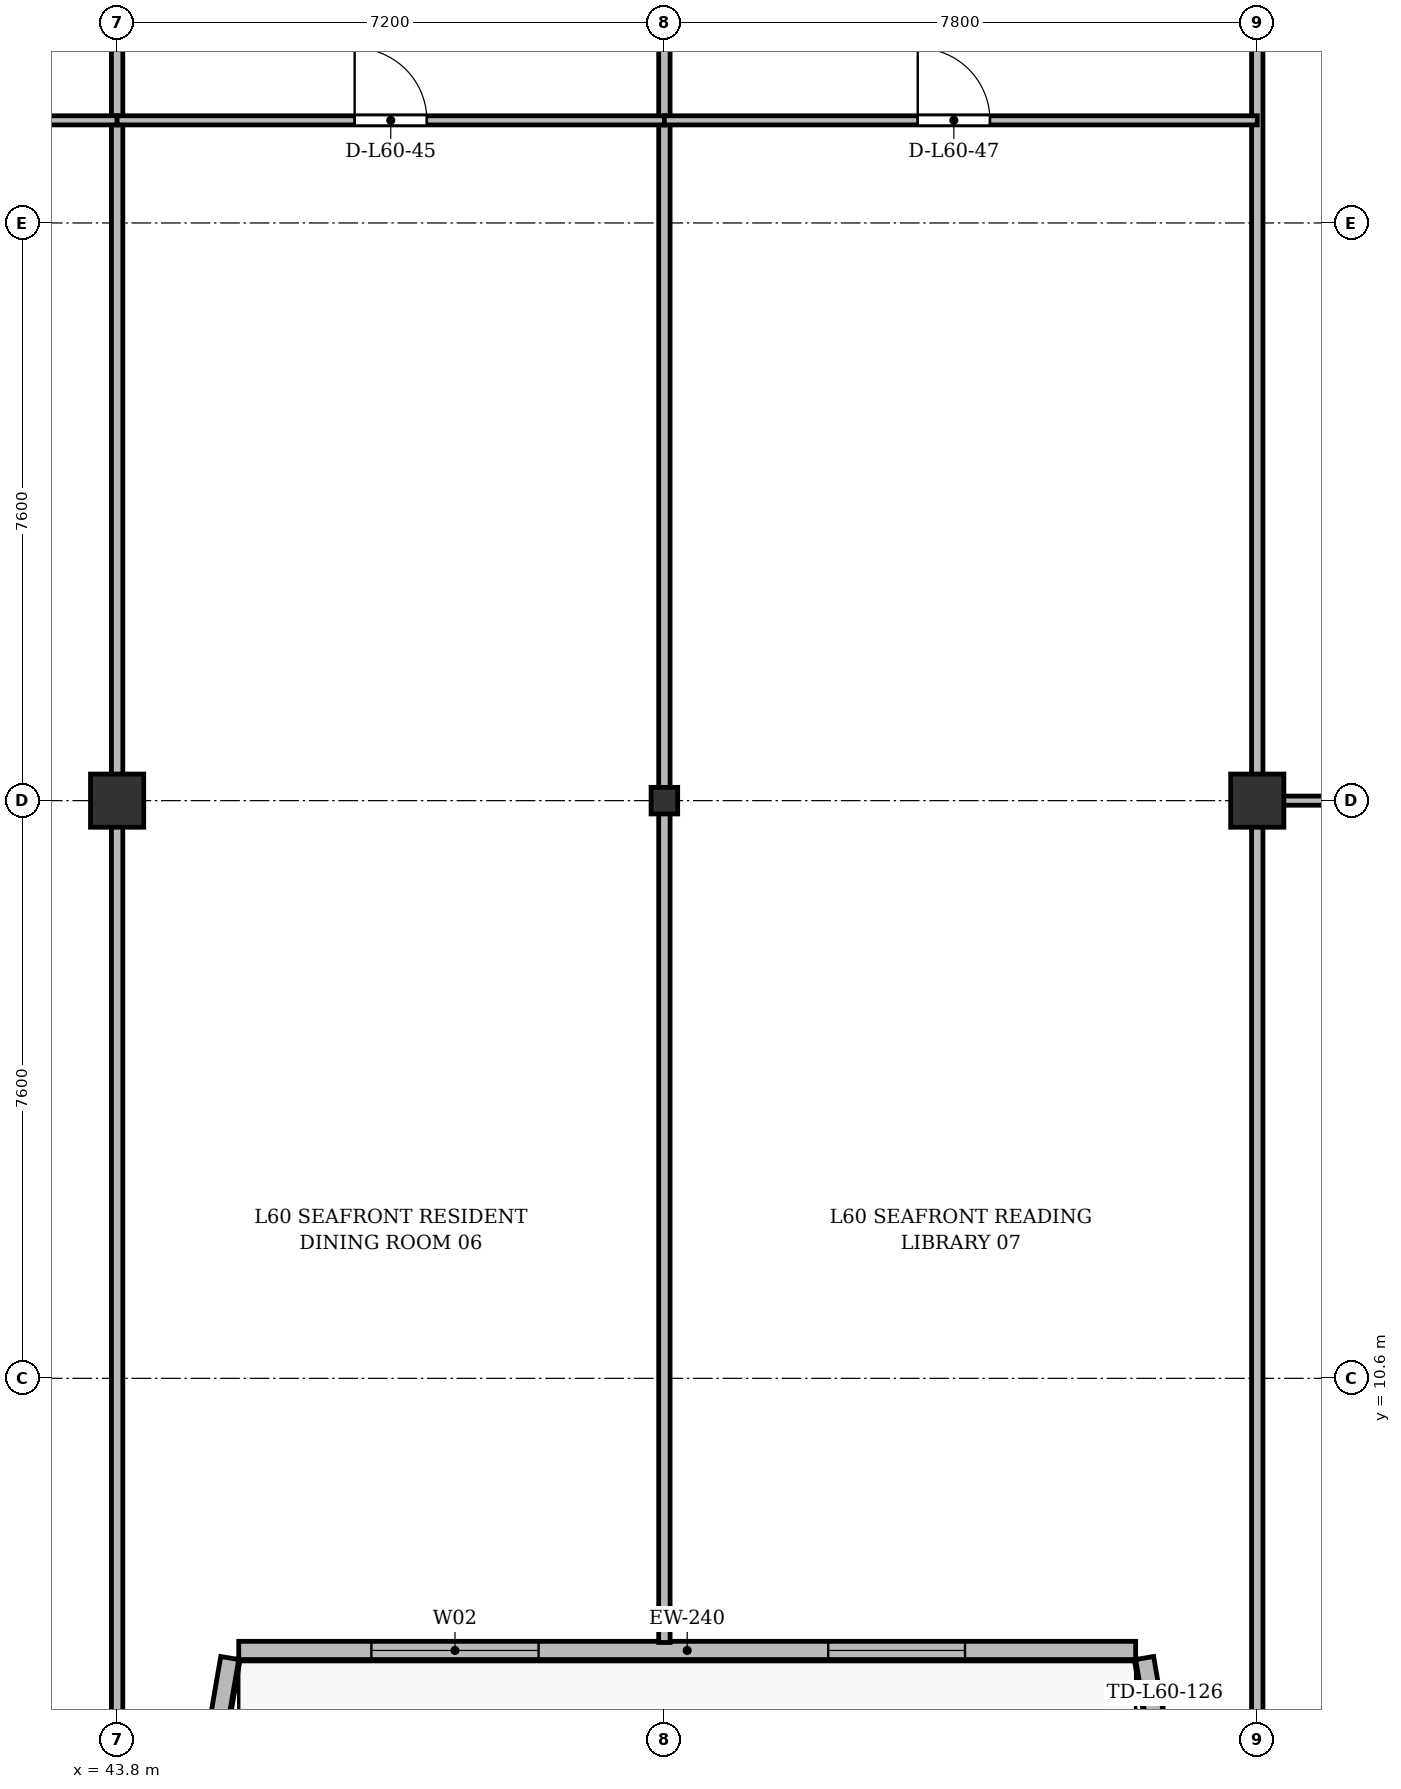
"""IFC4 building model, lengths in metres.
Left out: names, types, materials, properties, quantities, classifications, styles, units other than length and angle.
Written with IfcOpenShell. Run it as: python <this file> out.ifc"""

import sys

from ifc_helpers import new_model, si_unit, direction, frame, frame_2d, origin, origin_2d, place, context, subcontext, project, spatial, rectangle, i_section, extrude, source, transform, mapped, element, fill, save


model = new_model("IFC4")
c1 = context("Model", 3, precision=1e-05, world=origin(), true_north=direction((0.0, 1.0)))
c2 = subcontext(c1, "Body", "Model", "MODEL_VIEW")
j1 = project(units=[si_unit("LENGTHUNIT", "METRE"), si_unit("PLANEANGLEUNIT", "RADIAN")], contexts=[c1])
p1 = place(None, origin())
s1 = spatial("IfcSite", under=j1, at=p1, CompositionType="ELEMENT")
p2 = place(p1, origin())
s2 = spatial("IfcBuilding", under=s1, at=p2, CompositionType="ELEMENT")
p3 = place(p2, frame((0.0, 0.0, 230.1)))
s3 = spatial("IfcBuildingStorey", under=s2, at=p3, CompositionType="ELEMENT", Elevation=230.1)
m1 = source(origin(), c2, "Body", "SweptSolid", [
    extrude(rectangle(XDim=0.7, YDim=0.7, at=origin_2d()), origin(), (0.0, 0.0, 1.0), 3.6),
])
p4 = place(p3, frame((43.8, 18.2, 0.0), z_axis=(0.0, 0.0, 1.0), x_axis=(1.0, 0.0, 0.0)))
e1 = element("IfcColumn", 1, at=p4, inside=s3, PredefinedType="COLUMN", context=c2, shape_type="MappedRepresentation", body=[
    mapped(m1, transform((0.0, 0.0, 0.0), x_axis=(1.0, 0.0, 0.0), y_axis=(0.0, 1.0, 0.0), z_axis=(0.0, 0.0, 1.0), scale=1.0)),
])
m2 = source(origin(), c2, "Body", "SweptSolid", [
    extrude(i_section(OverallWidth=0.35, OverallDepth=0.35, WebThickness=0.018, FlangeThickness=0.028, at=origin_2d()), origin(), (0.0, 0.0, 1.0), 3.6),
])
p5 = place(p3, frame((51.0, 18.2, 0.0), z_axis=(0.0, 0.0, 1.0), x_axis=(1.0, 0.0, 0.0)))
e2 = element("IfcColumn", 2, at=p5, inside=s3, PredefinedType="COLUMN", context=c2, shape_type="MappedRepresentation", body=[
    mapped(m2, transform((0.0, 0.0, 0.0), x_axis=(1.0, 0.0, 0.0), y_axis=(0.0, 1.0, 0.0), z_axis=(0.0, 0.0, 1.0), scale=1.0)),
])
p6 = place(p3, frame((58.8, 18.2, 0.0), z_axis=(0.0, 0.0, 1.0), x_axis=(1.0, 0.0, 0.0)))
e3 = element("IfcColumn", 3, at=p6, inside=s3, PredefinedType="COLUMN", context=c2, shape_type="MappedRepresentation", body=[
    mapped(m1, transform((0.0, 0.0, 0.0), x_axis=(1.0, 0.0, 0.0), y_axis=(0.0, 1.0, 0.0), z_axis=(0.0, 0.0, 1.0), scale=1.0)),
])
p7 = place(p3, frame((57.918, 3.42, 0.0), z_axis=(0.0, 0.0, 1.0), x_axis=(-0.168923741424, 0.98562912375, 0.0)))
e4 = element("IfcWall", 4, at=p7, inside=s3, PredefinedType="SOLIDWALL", context=c2, shape_type="SweptSolid", body=[
    extrude(rectangle(XDim=3.551, YDim=0.24, at=frame_2d((1.775, 0.0))), origin(), (0.0, 0.0, 1.0), 2.91),
])
p8 = place(p7, frame((1.374, 0.0, 0.0)))
e5 = element("IfcOpeningElement", 5, at=p8, cuts=e4, PredefinedType="OPENING", context=c2, shape_type="SweptSolid", body=[
    extrude(rectangle(XDim=1.2, YDim=2.2, at=frame_2d((0.6, 1.1))), frame((0.0, 0.13, 0.0), z_axis=(0.0, -1.0, 0.0), x_axis=(1.0, 0.0, 0.0)), (0.0, 0.0, 1.0), 0.26),
])
p9 = place(p3, frame((57.2, 7.02, 0.0), z_axis=(0.0, 0.0, 1.0), x_axis=(-1.0, 0.0, 0.0)))
e6 = element("IfcWall", 6, at=p9, inside=s3, PredefinedType="SOLIDWALL", context=c2, shape_type="SweptSolid", body=[
    extrude(rectangle(XDim=11.8, YDim=0.24, at=frame_2d((5.9, 0.0))), origin(), (0.0, 0.0, 1.0), 2.86),
])
p10 = place(p9, frame((2.245, 0.0, 0.9)))
e7 = element("IfcOpeningElement", 7, at=p10, cuts=e6, PredefinedType="OPENING", context=c2, shape_type="SweptSolid", body=[
    extrude(rectangle(XDim=1.8, YDim=1.8, at=frame_2d((0.9, 0.9))), frame((0.0, 0.13, 0.0), z_axis=(0.0, -1.0, 0.0), x_axis=(1.0, 0.0, 0.0)), (0.0, 0.0, 1.0), 0.26),
])
p11 = place(p9, frame((7.855, 0.0, 0.9)))
e8 = element("IfcOpeningElement", 8, at=p11, cuts=e6, PredefinedType="OPENING", context=c2, shape_type="SweptSolid", body=[
    extrude(rectangle(XDim=2.2, YDim=1.8, at=frame_2d((1.1, 0.9))), frame((0.0, 0.13, 0.0), z_axis=(0.0, -1.0, 0.0), x_axis=(1.0, 0.0, 0.0)), (0.0, 0.0, 1.0), 0.26),
])
p12 = place(p3, frame((45.282, 6.92, 0.0), z_axis=(0.0, 0.0, 1.0), x_axis=(-0.168990530437, -0.98561767467, 0.0)))
e9 = element("IfcWall", 9, at=p12, inside=s3, PredefinedType="SOLIDWALL", context=c2, shape_type="SweptSolid", body=[
    extrude(rectangle(XDim=3.551, YDim=0.24, at=frame_2d((1.775, 0.0))), origin(), (0.0, 0.0, 1.0), 2.91),
])
p13 = place(p3, frame((43.8, 3.625, 0.0), z_axis=(0.0, 0.0, 1.0), x_axis=(0.0, 1.0, 0.0)))
e10 = element("IfcWall", 10, at=p13, inside=s3, PredefinedType="PARTITIONING", context=c2, shape_type="SweptSolid", body=[
    extrude(rectangle(XDim=27.375, YDim=0.15, at=frame_2d((13.688, 0.0))), origin(), (0.0, 0.0, 1.0), 2.86),
])
p14 = place(p3, frame((51.0, 7.125, 0.0), z_axis=(0.0, 0.0, 1.0), x_axis=(0.0, 1.0, 0.0)))
e11 = element("IfcWall", 11, at=p14, inside=s3, PredefinedType="PARTITIONING", context=c2, shape_type="SweptSolid", body=[
    extrude(rectangle(XDim=23.875, YDim=0.15, at=frame_2d((11.938, 0.0))), origin(), (0.0, 0.0, 1.0), 2.86),
])
p15 = place(p3, frame((58.8, 3.625, 0.0), z_axis=(0.0, 0.0, 1.0), x_axis=(0.0, 1.0, 0.0)))
e12 = element("IfcWall", 12, at=p15, inside=s3, PredefinedType="PARTITIONING", context=c2, shape_type="SweptSolid", body=[
    extrude(rectangle(XDim=27.375, YDim=0.15, at=frame_2d((13.688, 0.0))), origin(), (0.0, 0.0, 1.0), 2.86),
])
p16 = place(p3, frame((39.2, 27.15, 0.0), z_axis=(0.0, 0.0, 1.0), x_axis=(1.0, 0.0, 0.0)))
e13 = element("IfcWall", 13, at=p16, inside=s3, PredefinedType="PARTITIONING", context=c2, shape_type="SweptSolid", body=[
    extrude(rectangle(XDim=4.6, YDim=0.12, at=frame_2d((2.3, 0.0))), origin(), (0.0, 0.0, 1.0), 2.86),
])
p17 = place(p16, frame((1.825, 0.0, 0.0)))
e14 = element("IfcOpeningElement", 14, at=p17, cuts=e13, PredefinedType="OPENING", context=c2, shape_type="SweptSolid", body=[
    extrude(rectangle(XDim=0.95, YDim=2.15, at=frame_2d((0.475, 1.075))), frame((0.0, 0.07, 0.0), z_axis=(0.0, -1.0, 0.0), x_axis=(1.0, 0.0, 0.0)), (0.0, 0.0, 1.0), 0.14),
])
p18 = place(p3, frame((43.8, 27.15, 0.0), z_axis=(0.0, 0.0, 1.0), x_axis=(1.0, 0.0, 0.0)))
e15 = element("IfcWall", 15, at=p18, inside=s3, PredefinedType="PARTITIONING", context=c2, shape_type="SweptSolid", body=[
    extrude(rectangle(XDim=7.2, YDim=0.12, at=frame_2d((3.6, 0.0))), origin(), (0.0, 0.0, 1.0), 2.86),
])
p19 = place(p18, frame((3.125, 0.0, 0.0)))
e16 = element("IfcOpeningElement", 16, at=p19, cuts=e15, PredefinedType="OPENING", context=c2, shape_type="SweptSolid", body=[
    extrude(rectangle(XDim=0.95, YDim=2.15, at=frame_2d((0.475, 1.075))), frame((0.0, 0.07, 0.0), z_axis=(0.0, -1.0, 0.0), x_axis=(1.0, 0.0, 0.0)), (0.0, 0.0, 1.0), 0.14),
])
p20 = place(p3, frame((51.0, 27.15, 0.0), z_axis=(0.0, 0.0, 1.0), x_axis=(1.0, 0.0, 0.0)))
e17 = element("IfcWall", 17, at=p20, inside=s3, PredefinedType="PARTITIONING", context=c2, shape_type="SweptSolid", body=[
    extrude(rectangle(XDim=7.8, YDim=0.12, at=frame_2d((3.9, 0.0))), origin(), (0.0, 0.0, 1.0), 2.86),
])
p21 = place(p20, frame((3.333, 0.0, 0.0)))
e18 = element("IfcOpeningElement", 18, at=p21, cuts=e17, PredefinedType="OPENING", context=c2, shape_type="SweptSolid", body=[
    extrude(rectangle(XDim=0.95, YDim=2.15, at=frame_2d((0.475, 1.075))), frame((0.0, 0.07, 0.0), z_axis=(0.0, -1.0, 0.0), x_axis=(1.0, 0.0, 0.0)), (0.0, 0.0, 1.0), 0.14),
])
p22 = place(p3, frame((58.8, 18.2, 0.0), z_axis=(0.0, 0.0, 1.0), x_axis=(1.0, 0.0, 0.0)))
e19 = element("IfcWall", 19, at=p22, inside=s3, PredefinedType="PARTITIONING", context=c2, shape_type="SweptSolid", body=[
    extrude(rectangle(XDim=7.375, YDim=0.12, at=frame_2d((3.688, 0.0))), origin(), (0.0, 0.0, 1.0), 2.91),
])
p23 = place(p22, frame((3.304, 0.0, 0.0)))
e20 = element("IfcOpeningElement", 20, at=p23, cuts=e19, PredefinedType="OPENING", context=c2, shape_type="SweptSolid", body=[
    extrude(rectangle(XDim=0.95, YDim=2.15, at=frame_2d((0.475, 1.075))), frame((0.0, 0.07, 0.0), z_axis=(0.0, -1.0, 0.0), x_axis=(1.0, 0.0, 0.0)), (0.0, 0.0, 1.0), 0.14),
])
m3 = source(origin(), c2, "Body", "SweptSolid", [
    extrude(rectangle(XDim=1.8, YDim=1.8, at=frame_2d((0.9, 0.9))), frame((0.0, 0.03, 0.0), z_axis=(0.0, -1.0, 0.0), x_axis=(1.0, 0.0, 0.0)), (0.0, 0.0, 1.0), 0.06),
])
p24 = place(p10, origin())
e21 = element("IfcWindow", 21, at=p24, inside=s3, PartitioningType="SINGLE_PANEL", PredefinedType="WINDOW", context=c2, shape_type="MappedRepresentation", body=[
    mapped(m3, transform((0.0, 0.0, 0.0), x_axis=(1.0, 0.0, 0.0), y_axis=(0.0, 1.0, 0.0), z_axis=(0.0, 0.0, 1.0), scale=1.0)),
])
fill(e7, e21)
m4 = source(origin(), c2, "Body", "SweptSolid", [
    extrude(rectangle(XDim=2.2, YDim=1.8, at=frame_2d((1.1, 0.9))), frame((0.0, 0.03, 0.0), z_axis=(0.0, -1.0, 0.0), x_axis=(1.0, 0.0, 0.0)), (0.0, 0.0, 1.0), 0.06),
])
p25 = place(p11, origin())
e22 = element("IfcWindow", 22, at=p25, inside=s3, PartitioningType="SINGLE_PANEL", PredefinedType="WINDOW", context=c2, shape_type="MappedRepresentation", body=[
    mapped(m4, transform((0.0, 0.0, 0.0), x_axis=(1.0, 0.0, 0.0), y_axis=(0.0, 1.0, 0.0), z_axis=(0.0, 0.0, 1.0), scale=1.0)),
])
fill(e8, e22)
m5 = source(origin(), c2, "Body", "SweptSolid", [
    extrude(rectangle(XDim=0.95, YDim=2.15, at=frame_2d((0.475, 1.075))), frame((0.0, 0.025, 0.0), z_axis=(0.0, -1.0, 0.0), x_axis=(1.0, 0.0, 0.0)), (0.0, 0.0, 1.0), 0.05),
])
p26 = place(p19, origin())
e23 = element("IfcDoor", 23, at=p26, inside=s3, OperationType="SINGLE_SWING_LEFT", PredefinedType="DOOR", context=c2, shape_type="MappedRepresentation", body=[
    mapped(m5, transform((0.0, 0.0, 0.0), x_axis=(1.0, 0.0, 0.0), y_axis=(0.0, 1.0, 0.0), z_axis=(0.0, 0.0, 1.0), scale=1.0)),
])
fill(e16, e23)
p27 = place(p21, origin())
e24 = element("IfcDoor", 24, at=p27, inside=s3, OperationType="SINGLE_SWING_LEFT", PredefinedType="DOOR", context=c2, shape_type="MappedRepresentation", body=[
    mapped(m5, transform((0.0, 0.0, 0.0), x_axis=(1.0, 0.0, 0.0), y_axis=(0.0, 1.0, 0.0), z_axis=(0.0, 0.0, 1.0), scale=1.0)),
])
fill(e18, e24)
save(model, sys.argv[1])
